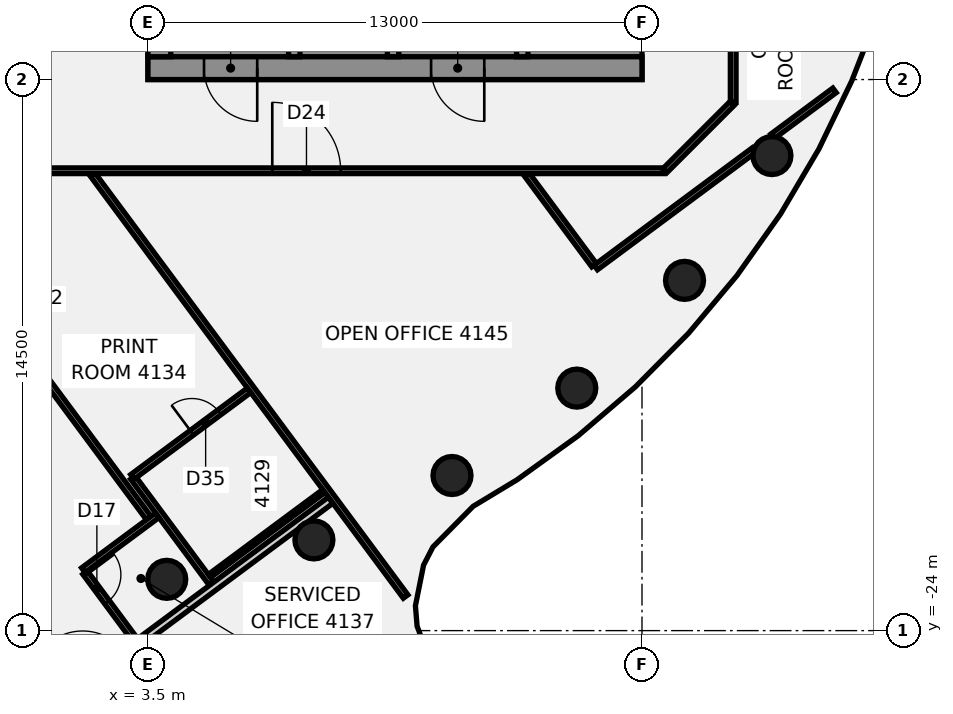
"""IFC4 building model, lengths in metres.
Left out: names, types, materials, properties, quantities, classifications, styles, units other than length and angle.
Written with IfcOpenShell. Run it as: python <this file> out.ifc"""

import sys

from ifc_helpers import new_model, si_unit, direction, frame, frame_2d, origin, origin_2d, place, context, subcontext, project, spatial, polyline, rectangle, circle, outline, extrude, element, fill, save


model = new_model("IFC4")
c1 = context("Model", 3, precision=1e-05, world=origin(), true_north=direction((0.0, 1.0)))
c2 = subcontext(c1, "Body", "Model", "MODEL_VIEW")
j1 = project(units=[si_unit("LENGTHUNIT", "METRE"), si_unit("PLANEANGLEUNIT", "RADIAN")], contexts=[c1])
p1 = place(None, origin())
s1 = spatial("IfcSite", under=j1, at=p1, CompositionType="ELEMENT")
p2 = place(p1, origin())
s2 = spatial("IfcBuilding", under=s1, at=p2, CompositionType="ELEMENT")
p3 = place(p2, frame((0.0, 0.0, 166.75)))
s3 = spatial("IfcBuildingStorey", under=s2, at=p3, CompositionType="ELEMENT", Elevation=166.75)
for number, where, z_axis, x_axis in (
    (1, (3.994, -22.651, -0.14), (0.0, 0.0, 1.0), (1.0, 0.0, 0.0)),
    (2, (7.866, -21.613, -0.14), (0.0, 0.0, 1.0), (1.0, 0.0, 0.0)),
    (3, (11.5, -19.919, -0.14), (0.0, 0.0, 1.0), (1.0, 0.0, 0.0)),
    (4, (14.784, -17.619, -0.14), (0.0, 0.0, 1.0), (1.0, 0.0, 0.0)),
    (5, (17.619, -14.784, -0.14), (0.0, 0.0, 1.0), (1.0, 0.0, 0.0)),
    (6, (19.919, -11.5, -0.14), (0.0, 0.0, 1.0), (1.0, 0.0, 0.0)),
):
    element("IfcColumn", number, at=place(p3, frame(where, z_axis=z_axis, x_axis=x_axis)), inside=s3, PredefinedType="COLUMN", context=c2, shape_type="SweptSolid", body=[
        extrude(circle(Radius=0.5, at=origin_2d()), origin(), (0.0, 0.0, 1.0), 3.75),
    ])
p4 = place(p3, frame((-3.185, -12.0, 0.0), z_axis=(0.0, 0.0, 1.0), x_axis=(0.595796799858, -0.803135214817, 0.0)))
e7 = element("IfcWall", 7, at=p4, inside=s3, PredefinedType="PARTITIONING", context=c2, shape_type="SweptSolid", body=[
    extrude(rectangle(XDim=11.249, YDim=0.15, at=frame_2d((5.624, 0.0))), origin(), (0.0, 0.0, 1.0), 3.01),
])
p5 = place(p4, frame((3.625, 0.0, 0.0)))
e8 = element("IfcOpeningElement", 8, at=p5, cuts=e7, PredefinedType="OPENING", context=c2, shape_type="SweptSolid", body=[
    extrude(rectangle(XDim=0.9, YDim=2.1, at=frame_2d((0.45, 1.05))), frame((0.0, 0.085, 0.0), z_axis=(0.0, -1.0, 0.0), x_axis=(1.0, 0.0, 0.0)), (0.0, 0.0, 1.0), 0.17),
])
p6 = place(p3, frame((-0.245, -24.018, 0.0), z_axis=(0.0, 0.0, 1.0), x_axis=(0.595725941759, -0.803187775252, 0.0)))
e9 = element("IfcWall", 9, at=p6, inside=s3, PredefinedType="PARTITIONING", context=c2, shape_type="SweptSolid", body=[
    extrude(rectangle(XDim=2.225, YDim=0.15, at=frame_2d((1.113, 0.0))), origin(), (0.0, 0.0, 1.0), 3.01),
])
p7 = place(p6, frame((0.525, 0.0, 0.0)))
e10 = element("IfcOpeningElement", 10, at=p7, cuts=e9, PredefinedType="OPENING", context=c2, shape_type="SweptSolid", body=[
    extrude(rectangle(XDim=0.9, YDim=2.1, at=frame_2d((0.45, 1.05))), frame((0.0, 0.085, 0.0), z_axis=(0.0, -1.0, 0.0), x_axis=(1.0, 0.0, 0.0)), (0.0, 0.0, 1.0), 0.17),
])
p8 = place(p3, frame((1.846, -22.473, 0.0), z_axis=(0.0, 0.0, 1.0), x_axis=(0.595730224084, -0.803184599026, 0.0)))
e11 = element("IfcWall", 11, at=p8, inside=s3, PredefinedType="PARTITIONING", context=c2, shape_type="SweptSolid", body=[
    extrude(rectangle(XDim=20.24, YDim=0.15, at=frame_2d((10.12, 0.0))), origin(), (0.0, 0.0, 1.0), 3.01),
])
p9 = place(p8, frame((0.07, 0.0, 0.0)))
e12 = element("IfcOpeningElement", 12, at=p9, cuts=e11, PredefinedType="OPENING", context=c2, shape_type="SweptSolid", body=[
    extrude(rectangle(XDim=0.9, YDim=2.1, at=frame_2d((0.45, 1.05))), frame((0.0, 0.085, 0.0), z_axis=(0.0, -1.0, 0.0), x_axis=(1.0, 0.0, 0.0)), (0.0, 0.0, 1.0), 0.17),
])
p10 = place(p8, frame((10.57, 0.0, 0.0)))
e13 = element("IfcOpeningElement", 13, at=p10, cuts=e11, PredefinedType="OPENING", context=c2, shape_type="SweptSolid", body=[
    extrude(rectangle(XDim=0.9, YDim=2.1, at=frame_2d((0.45, 1.05))), frame((0.0, 0.085, 0.0), z_axis=(0.0, -1.0, 0.0), x_axis=(1.0, 0.0, 0.0)), (0.0, 0.0, 1.0), 0.17),
])
p11 = place(p8, frame((17.021, 0.0, 0.0)))
e14 = element("IfcOpeningElement", 14, at=p11, cuts=e11, PredefinedType="OPENING", context=c2, shape_type="SweptSolid", body=[
    extrude(rectangle(XDim=0.9, YDim=2.1, at=frame_2d((0.45, 1.05))), frame((0.0, 0.085, 0.0), z_axis=(0.0, -1.0, 0.0), x_axis=(1.0, 0.0, 0.0)), (0.0, 0.0, 1.0), 0.17),
])
p12 = place(p3, frame((2.045, -12.0, 0.0), z_axis=(0.0, 0.0, 1.0), x_axis=(0.595715728825, -0.803195350105, 0.0)))
e15 = element("IfcWall", 15, at=p12, inside=s3, PredefinedType="PARTITIONING", context=c2, shape_type="SweptSolid", body=[
    extrude(rectangle(XDim=13.823, YDim=0.15, at=frame_2d((6.911, 0.0))), origin(), (0.0, 0.0, 1.0), 3.01),
])
p13 = place(p3, frame((3.103, -19.972, 0.0), z_axis=(0.0, 0.0, 1.0), x_axis=(0.595758856769, -0.80316336108, 0.0)))
e16 = element("IfcWall", 16, at=p13, inside=s3, PredefinedType="PARTITIONING", context=c2, shape_type="SweptSolid", body=[
    extrude(rectangle(XDim=3.461, YDim=0.15, at=frame_2d((1.73, 0.0))), origin(), (0.0, 0.0, 1.0), 3.01),
])
p14 = place(p3, frame((13.47, -12.0, 0.0), z_axis=(0.0, 0.0, 1.0), x_axis=(0.595807571088, -0.803127224189, 0.0)))
e17 = element("IfcWall", 17, at=p14, inside=s3, PredefinedType="PARTITIONING", context=c2, shape_type="SweptSolid", body=[
    extrude(rectangle(XDim=2.969, YDim=0.15, at=frame_2d((1.484, 0.0))), origin(), (0.0, 0.0, 1.0), 3.01),
])
p15 = place(p3, frame((-17.1, -11.9, 0.0), z_axis=(0.0, 0.0, 1.0), x_axis=(1.0, 0.0, 0.0)))
e18 = element("IfcWall", 18, at=p15, inside=s3, PredefinedType="PARTITIONING", context=c2, shape_type="SweptSolid", body=[
    extrude(rectangle(XDim=34.165, YDim=0.15, at=frame_2d((17.083, 0.0))), origin(), (0.0, 0.0, 1.0), 3.01),
])
p16 = place(p15, frame((9.617, 0.0, 0.0)))
e19 = element("IfcOpeningElement", 19, at=p16, cuts=e18, PredefinedType="OPENING", context=c2, shape_type="SweptSolid", body=[
    extrude(rectangle(XDim=1.8, YDim=2.1, at=frame_2d((0.9, 1.05))), frame((0.0, 0.085, 0.0), z_axis=(0.0, -1.0, 0.0), x_axis=(1.0, 0.0, 0.0)), (0.0, 0.0, 1.0), 0.17),
])
p17 = place(p15, frame((1.95, 0.0, 0.0)))
e20 = element("IfcOpeningElement", 20, at=p17, cuts=e18, PredefinedType="OPENING", context=c2, shape_type="SweptSolid", body=[
    extrude(rectangle(XDim=1.8, YDim=2.1, at=frame_2d((0.9, 1.05))), frame((0.0, 0.085, 0.0), z_axis=(0.0, -1.0, 0.0), x_axis=(1.0, 0.0, 0.0)), (0.0, 0.0, 1.0), 0.17),
])
p18 = place(p15, frame((23.871, 0.0, 0.0)))
e21 = element("IfcOpeningElement", 21, at=p18, cuts=e18, PredefinedType="OPENING", context=c2, shape_type="SweptSolid", body=[
    extrude(rectangle(XDim=1.8, YDim=2.1, at=frame_2d((0.9, 1.05))), frame((0.0, 0.085, 0.0), z_axis=(0.0, -1.0, 0.0), x_axis=(1.0, 0.0, 0.0)), (0.0, 0.0, 1.0), 0.17),
])
p19 = place(p3, frame((3.09, -19.955, 0.0), z_axis=(0.0, 0.0, 1.0), x_axis=(0.803088161311, 0.595860222839, 0.0)))
e22 = element("IfcWall", 22, at=p19, inside=s3, PredefinedType="PARTITIONING", context=c2, shape_type="SweptSolid", body=[
    extrude(rectangle(XDim=3.82, YDim=0.15, at=frame_2d((1.91, 0.0))), origin(), (0.0, 0.0, 1.0), 3.01),
])
p20 = place(p19, frame((1.95, 0.0, 0.0)))
e23 = element("IfcOpeningElement", 23, at=p20, cuts=e22, PredefinedType="OPENING", context=c2, shape_type="SweptSolid", body=[
    extrude(rectangle(XDim=0.9, YDim=2.1, at=frame_2d((0.45, 1.05))), frame((0.0, 0.085, 0.0), z_axis=(0.0, -1.0, 0.0), x_axis=(1.0, 0.0, 0.0)), (0.0, 0.0, 1.0), 0.17),
])
p21 = place(p3, frame((-3.116, -29.043, 0.0), z_axis=(0.0, 0.0, 1.0), x_axis=(0.803114725205, 0.595824418901, 0.0)))
e24 = element("IfcWall", 24, at=p21, inside=s3, PredefinedType="PARTITIONING", context=c2, shape_type="SweptSolid", body=[
    extrude(rectangle(XDim=14.219, YDim=0.2, at=frame_2d((7.11, 0.0))), origin(), (0.0, 0.0, 1.0), 3.01),
])
p22 = place(p21, frame((6.099, 0.0, 0.0)))
e25 = element("IfcOpeningElement", 25, at=p22, cuts=e24, PredefinedType="OPENING", context=c2, shape_type="SweptSolid", body=[
    extrude(rectangle(XDim=1.4, YDim=2.1, at=frame_2d((0.7, 1.05))), frame((0.0, 0.11, 0.0), z_axis=(0.0, -1.0, 0.0), x_axis=(1.0, 0.0, 0.0)), (0.0, 0.0, 1.0), 0.22),
])
p23 = place(p3, frame((1.798, -22.409, 0.0), z_axis=(0.0, 0.0, 1.0), x_axis=(0.803172774145, 0.595746166477, 0.0)))
e26 = element("IfcWall", 26, at=p23, inside=s3, PredefinedType="PARTITIONING", context=c2, shape_type="SweptSolid", body=[
    extrude(rectangle(XDim=2.42, YDim=0.15, at=frame_2d((1.21, 0.0))), origin(), (0.0, 0.0, 1.0), 3.01),
])
p24 = place(p3, frame((5.121, -22.559, 0.0), z_axis=(0.0, 0.0, 1.0), x_axis=(0.803099035859, 0.595845566067, 0.0)))
e27 = element("IfcWall", 27, at=p24, inside=s3, PredefinedType="PARTITIONING", context=c2, shape_type="SweptSolid", body=[
    extrude(rectangle(XDim=3.74, YDim=0.1, at=frame_2d((1.87, 0.0))), origin(), (0.0, 0.0, 1.0), 3.01),
])
p25 = place(p3, frame((15.284, -14.445, 0.0), z_axis=(0.0, 0.0, 1.0), x_axis=(0.803131470392, 0.595801847317, 0.0)))
e28 = element("IfcWall", 28, at=p25, inside=s3, PredefinedType="PARTITIONING", context=c2, shape_type="SweptSolid", body=[
    extrude(rectangle(XDim=5.184, YDim=0.15, at=frame_2d((2.592, 0.0))), origin(), (0.0, 0.0, 1.0), 3.01),
])
p26 = place(p3, frame((19.935, -10.994, 0.0), z_axis=(0.0, 0.0, 1.0), x_axis=(0.803148127908, 0.595779392593, 0.0)))
e29 = element("IfcWall", 29, at=p26, inside=s3, PredefinedType="PARTITIONING", context=c2, shape_type="SweptSolid", body=[
    extrude(rectangle(XDim=2.031, YDim=0.15, at=frame_2d((1.016, 0.0))), origin(), (0.0, 0.0, 1.0), 3.01),
])
p27 = place(p3, frame((17.1, -11.9, 0.0), z_axis=(0.0, 0.0, 1.0), x_axis=(0.707106781187, 0.707106781187, 0.0)))
e30 = element("IfcWall", 30, at=p27, inside=s3, PredefinedType="PARTITIONING", context=c2, shape_type="SweptSolid", body=[
    extrude(rectangle(XDim=2.505, YDim=0.15, at=frame_2d((1.253, 0.0))), origin(), (0.0, 0.0, 1.0), 3.01),
])
p28 = place(p3, frame((18.9, -10.1, 0.0), z_axis=(0.0, 0.0, 1.0), x_axis=(0.0, 1.0, 0.0)))
e31 = element("IfcWall", 31, at=p28, inside=s3, PredefinedType="PARTITIONING", context=c2, shape_type="SweptSolid", body=[
    extrude(rectangle(XDim=20.2, YDim=0.15, at=frame_2d((10.1, 0.0))), origin(), (0.0, 0.0, 1.0), 3.01),
])
p29 = place(p28, frame((7.917, 0.0, 0.0)))
e32 = element("IfcOpeningElement", 32, at=p29, cuts=e31, PredefinedType="OPENING", context=c2, shape_type="SweptSolid", body=[
    extrude(rectangle(XDim=1.8, YDim=2.1, at=frame_2d((0.9, 1.05))), frame((0.0, 0.085, 0.0), z_axis=(0.0, -1.0, 0.0), x_axis=(1.0, 0.0, 0.0)), (0.0, 0.0, 1.0), 0.17),
])
p30 = place(p28, frame((13.534, 0.0, 0.0)))
e33 = element("IfcOpeningElement", 33, at=p30, cuts=e31, PredefinedType="OPENING", context=c2, shape_type="SweptSolid", body=[
    extrude(rectangle(XDim=0.9, YDim=2.1, at=frame_2d((0.45, 1.05))), frame((0.0, 0.085, 0.0), z_axis=(0.0, -1.0, 0.0), x_axis=(1.0, 0.0, 0.0)), (0.0, 0.0, 1.0), 0.17),
])
p31 = place(p3, frame((16.5, -9.2, 0.0), z_axis=(0.0, 0.0, 1.0), x_axis=(-1.0, 0.0, 0.0)))
e34 = element("IfcWall", 34, at=p31, inside=s3, PredefinedType="SHEAR", context=c2, shape_type="SweptSolid", body=[
    extrude(rectangle(XDim=13.0, YDim=0.6, at=frame_2d((6.5, 0.0))), origin(), (0.0, 0.0, 1.0), 3.61),
])
p32 = place(p31, frame((4.15, 0.0, 0.0)))
e35 = element("IfcOpeningElement", 35, at=p32, cuts=e34, PredefinedType="OPENING", context=c2, shape_type="SweptSolid", body=[
    extrude(rectangle(XDim=1.4, YDim=2.1, at=frame_2d((0.7, 1.05))), frame((0.0, 0.31, 0.0), z_axis=(0.0, -1.0, 0.0), x_axis=(1.0, 0.0, 0.0)), (0.0, 0.0, 1.0), 0.62),
])
p33 = place(p31, frame((10.125, 0.0, 0.0)))
e36 = element("IfcOpeningElement", 36, at=p33, cuts=e34, PredefinedType="OPENING", context=c2, shape_type="SweptSolid", body=[
    extrude(rectangle(XDim=1.4, YDim=2.1, at=frame_2d((0.7, 1.05))), frame((0.0, 0.31, 0.0), z_axis=(0.0, -1.0, 0.0), x_axis=(1.0, 0.0, 0.0)), (0.0, 0.0, 1.0), 0.62),
])
p34 = place(p3, origin())
e37 = element("IfcWall", 37, at=p34, inside=s3, PredefinedType="SHEAR", context=c2, shape_type="SweptSolid", body=[
    extrude(outline(polyline([(13.5, -8.125), (13.5, -8.9), (15.9, -8.9), (16.5, -8.9), (16.5, 8.9), (15.9, 8.9), (13.5, 8.9), (13.5, 8.125), (15.9, 8.125), (15.9, 5.625), (13.5, 5.625), (13.5, 5.375), (15.9, 5.375), (15.9, -5.375), (13.5, -5.375), (13.5, -5.625), (15.9, -5.625), (15.9, -8.125), (13.5, -8.125)])), origin(), (0.0, 0.0, 1.0), 3.61),
])
p35 = place(p3, origin())
e38 = element("IfcWall", 38, at=p35, inside=s3, PredefinedType="SHEAR", context=c2, shape_type="SweptSolid", body=[
    extrude(outline(polyline([(7.5, -8.125), (7.5, -8.9), (9.8, -8.9), (9.8, -8.125), (9.8, -5.625), (9.55, -5.625), (9.55, -8.125), (7.5, -8.125)])), origin(), (0.0, 0.0, 1.0), 3.61),
])
p36 = place(p3, frame((7.35, -8.9, 0.0), z_axis=(0.0, 0.0, 1.0), x_axis=(0.0, 1.0, 0.0)))
e39 = element("IfcWall", 39, at=p36, inside=s3, PredefinedType="SHEAR", context=c2, shape_type="SweptSolid", body=[
    extrude(rectangle(XDim=0.775, YDim=0.3, at=frame_2d((0.387, 0.0))), origin(), (0.0, 0.0, 1.0), 3.61),
])
p37 = place(p3, frame((13.35, -8.9, 0.0), z_axis=(0.0, 0.0, 1.0), x_axis=(0.0, 1.0, 0.0)))
e40 = element("IfcWall", 40, at=p37, inside=s3, PredefinedType="SHEAR", context=c2, shape_type="SweptSolid", body=[
    extrude(rectangle(XDim=17.8, YDim=0.3, at=frame_2d((8.9, 0.0))), origin(), (0.0, 0.0, 1.0), 3.61),
])
p38 = place(p37, frame((1.325, 0.0, 0.0)))
e41 = element("IfcOpeningElement", 41, at=p38, cuts=e40, PredefinedType="OPENING", context=c2, shape_type="SweptSolid", body=[
    extrude(rectangle(XDim=1.4, YDim=2.1, at=frame_2d((0.7, 1.05))), frame((0.0, 0.16, 0.0), z_axis=(0.0, -1.0, 0.0), x_axis=(1.0, 0.0, 0.0)), (0.0, 0.0, 1.0), 0.32),
])
p39 = place(p37, frame((4.754, 0.0, 0.0)))
e42 = element("IfcOpeningElement", 42, at=p39, cuts=e40, PredefinedType="OPENING", context=c2, shape_type="SweptSolid", body=[
    extrude(rectangle(XDim=1.0, YDim=2.1, at=frame_2d((0.5, 1.05))), frame((0.0, 0.16, 0.0), z_axis=(0.0, -1.0, 0.0), x_axis=(1.0, 0.0, 0.0)), (0.0, 0.0, 1.0), 0.32),
])
p40 = place(p37, frame((10.254, 0.0, 0.0)))
e43 = element("IfcOpeningElement", 43, at=p40, cuts=e40, PredefinedType="OPENING", context=c2, shape_type="SweptSolid", body=[
    extrude(rectangle(XDim=1.0, YDim=2.1, at=frame_2d((0.5, 1.05))), frame((0.0, 0.16, 0.0), z_axis=(0.0, -1.0, 0.0), x_axis=(1.0, 0.0, 0.0)), (0.0, 0.0, 1.0), 0.32),
])
p41 = place(p3, frame((9.95, -8.9, 0.0), z_axis=(0.0, 0.0, 1.0), x_axis=(0.0, 1.0, 0.0)))
e44 = element("IfcWall", 44, at=p41, inside=s3, PredefinedType="SHEAR", context=c2, shape_type="SweptSolid", body=[
    extrude(rectangle(XDim=17.8, YDim=0.3, at=frame_2d((8.9, 0.0))), origin(), (0.0, 0.0, 1.0), 3.61),
])
p42 = place(p41, frame((4.175, 0.0, 0.0)))
e45 = element("IfcOpeningElement", 45, at=p42, cuts=e44, PredefinedType="OPENING", context=c2, shape_type="SweptSolid", body=[
    extrude(rectangle(XDim=1.2, YDim=2.1, at=frame_2d((0.6, 1.05))), frame((0.0, 0.16, 0.0), z_axis=(0.0, -1.0, 0.0), x_axis=(1.0, 0.0, 0.0)), (0.0, 0.0, 1.0), 0.32),
])
p43 = place(p41, frame((6.925, 0.0, 0.0)))
e46 = element("IfcOpeningElement", 46, at=p43, cuts=e44, PredefinedType="OPENING", context=c2, shape_type="SweptSolid", body=[
    extrude(rectangle(XDim=1.2, YDim=2.1, at=frame_2d((0.6, 1.05))), frame((0.0, 0.16, 0.0), z_axis=(0.0, -1.0, 0.0), x_axis=(1.0, 0.0, 0.0)), (0.0, 0.0, 1.0), 0.32),
])
p44 = place(p3, frame((3.8, -8.9, 0.0), z_axis=(0.0, 0.0, 1.0), x_axis=(0.0, 1.0, 0.0)))
e47 = element("IfcWall", 47, at=p44, inside=s3, PredefinedType="SHEAR", context=c2, shape_type="SweptSolid", body=[
    extrude(rectangle(XDim=17.8, YDim=0.6, at=frame_2d((8.9, 0.0))), origin(), (0.0, 0.0, 1.0), 3.61),
])
p45 = place(p44, frame((1.25, 0.0, 0.0)))
e48 = element("IfcOpeningElement", 48, at=p45, cuts=e47, PredefinedType="OPENING", context=c2, shape_type="SweptSolid", body=[
    extrude(rectangle(XDim=1.8, YDim=2.1, at=frame_2d((0.9, 1.05))), frame((0.0, 0.31, 0.0), z_axis=(0.0, -1.0, 0.0), x_axis=(1.0, 0.0, 0.0)), (0.0, 0.0, 1.0), 0.62),
])
p46 = place(p44, frame((13.8, 0.0, 0.0)))
e49 = element("IfcOpeningElement", 49, at=p46, cuts=e47, PredefinedType="OPENING", context=c2, shape_type="SweptSolid", body=[
    extrude(rectangle(XDim=1.0, YDim=2.1, at=frame_2d((0.5, 1.05))), frame((0.0, 0.31, 0.0), z_axis=(0.0, -1.0, 0.0), x_axis=(1.0, 0.0, 0.0)), (0.0, 0.0, 1.0), 0.62),
])
p47 = place(p9, origin())
e50 = element("IfcDoor", 50, at=p47, inside=s3, OperationType="SINGLE_SWING_RIGHT", PredefinedType="DOOR", context=c2, shape_type="SweptSolid", body=[
    extrude(rectangle(XDim=0.9, YDim=2.1, at=frame_2d((0.45, 1.05))), frame((0.0, 0.025, 0.0), z_axis=(0.0, -1.0, 0.0), x_axis=(1.0, 0.0, 0.0)), (0.0, 0.0, 1.0), 0.05),
])
fill(e12, e50)
p48 = place(p18, frame((1.8, 0.0, 0.0), z_axis=(0.0, 0.0, 1.0), x_axis=(-1.0, 0.0, 0.0)))
e51 = element("IfcDoor", 51, at=p48, inside=s3, OperationType="DOUBLE_DOOR_SINGLE_SWING", PredefinedType="DOOR", context=c2, shape_type="SweptSolid", body=[
    extrude(rectangle(XDim=1.8, YDim=2.1, at=frame_2d((0.9, 1.05))), frame((0.0, 0.025, 0.0), z_axis=(0.0, -1.0, 0.0), x_axis=(1.0, 0.0, 0.0)), (0.0, 0.0, 1.0), 0.05),
])
fill(e21, e51)
p49 = place(p20, frame((0.9, 0.0, 0.0), z_axis=(0.0, 0.0, 1.0), x_axis=(-1.0, 0.0, 0.0)))
e52 = element("IfcDoor", 52, at=p49, inside=s3, OperationType="SINGLE_SWING_RIGHT", PredefinedType="DOOR", context=c2, shape_type="SweptSolid", body=[
    extrude(rectangle(XDim=0.9, YDim=2.1, at=frame_2d((0.45, 1.05))), frame((0.0, 0.025, 0.0), z_axis=(0.0, -1.0, 0.0), x_axis=(1.0, 0.0, 0.0)), (0.0, 0.0, 1.0), 0.05),
])
fill(e23, e52)
p50 = place(p32, origin())
e53 = element("IfcDoor", 53, at=p50, inside=s3, OperationType="SINGLE_SWING_LEFT", PredefinedType="DOOR", context=c2, shape_type="SweptSolid", body=[
    extrude(rectangle(XDim=1.4, YDim=2.1, at=frame_2d((0.7, 1.05))), frame((0.0, 0.025, 0.0), z_axis=(0.0, -1.0, 0.0), x_axis=(1.0, 0.0, 0.0)), (0.0, 0.0, 1.0), 0.05),
])
fill(e35, e53)
p51 = place(p33, origin())
e54 = element("IfcDoor", 54, at=p51, inside=s3, OperationType="SINGLE_SWING_LEFT", PredefinedType="DOOR", context=c2, shape_type="SweptSolid", body=[
    extrude(rectangle(XDim=1.4, YDim=2.1, at=frame_2d((0.7, 1.05))), frame((0.0, 0.025, 0.0), z_axis=(0.0, -1.0, 0.0), x_axis=(1.0, 0.0, 0.0)), (0.0, 0.0, 1.0), 0.05),
])
fill(e36, e54)
save(model, sys.argv[1])
